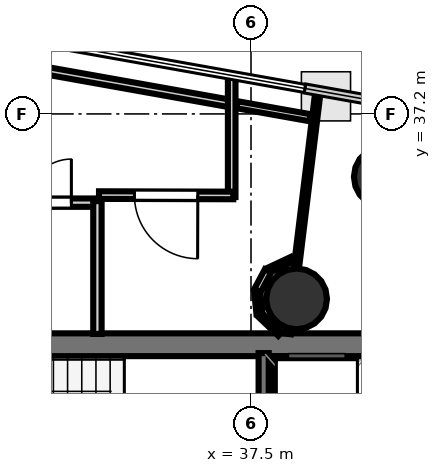
"""IFC4 building model, lengths in metres.
Left out: names, types, materials, properties, quantities, classifications, styles, units other than length and angle.
Written with IfcOpenShell. Run it as: python <this file> out.ifc"""

import sys

from ifc_helpers import new_model, si_unit, direction, frame, frame_2d, origin, origin_2d, place, context, subcontext, project, spatial, rectangle, hollow_circle, extrude, element, fill, save


model = new_model("IFC4")
c1 = context("Model", 3, precision=1e-05, world=origin(), true_north=direction((0.0, 1.0)))
c2 = subcontext(c1, "Body", "Model", "MODEL_VIEW")
j1 = project(units=[si_unit("LENGTHUNIT", "METRE"), si_unit("PLANEANGLEUNIT", "RADIAN")], contexts=[c1])
p1 = place(None, origin())
s1 = spatial("IfcSite", under=j1, at=p1, CompositionType="ELEMENT")
p2 = place(p1, origin())
s2 = spatial("IfcBuilding", under=s1, at=p2, CompositionType="ELEMENT")
p3 = place(p2, frame((0.0, 0.0, 207.7)))
s3 = spatial("IfcBuildingStorey", under=s2, at=p3, CompositionType="ELEMENT", Elevation=207.7)
p4 = place(p3, frame((29.33, 32.645, 0.0), z_axis=(0.0, 0.0, 1.0), x_axis=(1.0, 0.0, 0.0)))
e1 = element("IfcWall", 1, at=p4, inside=s3, PredefinedType="SHEAR", context=c2, shape_type="SweptSolid", body=[
    extrude(rectangle(XDim=10.52, YDim=0.45, at=frame_2d((5.26, 0.0))), origin(), (0.0, 0.0, 1.0), 3.52),
])
p5 = place(p4, frame((0.895, 0.0, 0.0)))
e2 = element("IfcOpeningElement", 2, at=p5, cuts=e1, PredefinedType="OPENING", context=c2, shape_type="SweptSolid", body=[
    extrude(rectangle(XDim=1.25, YDim=2.15, at=frame_2d((0.625, 1.075))), frame((0.0, 0.235, 0.0), z_axis=(0.0, -1.0, 0.0), x_axis=(1.0, 0.0, 0.0)), (0.0, 0.0, 1.0), 0.47),
])
p6 = place(p3, frame((38.18, 24.98, 0.0), z_axis=(0.0, 0.0, 1.0), x_axis=(0.0, 1.0, 0.0)))
e3 = element("IfcWall", 3, at=p6, inside=s3, PredefinedType="SHEAR", context=c2, shape_type="SweptSolid", body=[
    extrude(rectangle(XDim=7.44, YDim=0.45, at=frame_2d((3.72, 0.0))), origin(), (0.0, 0.0, 1.0), 3.52),
])
for number, where, z_axis, x_axis in (
    (4, (38.4, 33.55, 0.0), (0.0, 0.0, 1.0), (1.0, 0.0, 0.0)),
    (5, (40.131, 35.958, 0.0), (0.0, 0.0, 1.0), (1.0, 0.0, 0.0)),
):
    element("IfcColumn", number, at=place(p3, frame(where, z_axis=z_axis, x_axis=x_axis)), inside=s3, PredefinedType="COLUMN", context=c2, shape_type="SweptSolid", body=[
        extrude(hollow_circle(Radius=0.6, WallThickness=0.03, at=origin_2d()), origin(), (0.0, 0.0, 1.0), 3.7),
    ])
p7 = place(p3, frame((37.75, 30.12, 0.0), z_axis=(0.0, 0.0, 1.0), x_axis=(0.0, 1.0, 0.0)))
e6 = element("IfcWall", 6, at=p7, inside=s3, PredefinedType="SOLIDWALL", context=c2, shape_type="SweptSolid", body=[
    extrude(rectangle(XDim=2.36, YDim=0.2, at=frame_2d((1.18, 0.0))), origin(), (0.0, 0.0, 1.0), 3.52),
])
p8 = place(p3, frame((32.55, 35.449, 0.0), z_axis=(0.0, 0.0, 1.0), x_axis=(1.0, 0.0, 0.0)))
e7 = element("IfcWall", 7, at=p8, inside=s3, PredefinedType="PLUMBINGWALL", context=c2, shape_type="SweptSolid", body=[
    extrude(rectangle(XDim=1.95, YDim=0.165, at=frame_2d((0.975, 0.0))), origin(), (0.0, 0.0, 1.0), 2.84),
])
p9 = place(p8, frame((0.545, 0.0, 0.0)))
e8 = element("IfcOpeningElement", 8, at=p9, cuts=e7, PredefinedType="OPENING", context=c2, shape_type="SweptSolid", body=[
    extrude(rectangle(XDim=0.86, YDim=2.05, at=frame_2d((0.43, 1.025))), frame((0.0, 0.093, 0.0), z_axis=(0.0, -1.0, 0.0), x_axis=(1.0, 0.0, 0.0)), (0.0, 0.0, 1.0), 0.185),
])
p10 = place(p3, frame((34.469, 35.48, 0.0), z_axis=(0.0, 0.0, 1.0), x_axis=(0.0, -1.0, 0.0)))
e9 = element("IfcWall", 9, at=p10, inside=s3, PredefinedType="PLUMBINGWALL", context=c2, shape_type="SweptSolid", body=[
    extrude(rectangle(XDim=2.622, YDim=0.165, at=frame_2d((1.311, 0.0))), origin(), (0.0, 0.0, 1.0), 2.84),
])
p11 = place(p3, frame((31.966, 38.32, 0.0), z_axis=(0.0, 0.0, 1.0), x_axis=(0.98445853877, -0.175617155888, 0.0)))
e10 = element("IfcWall", 10, at=p11, inside=s3, PredefinedType="PARTITIONING", context=c2, shape_type="SweptSolid", body=[
    extrude(rectangle(XDim=5.26, YDim=0.15, at=frame_2d((2.63, 0.0))), origin(), (0.0, 0.0, 1.0), 2.84),
])
p12 = place(p3, frame((37.119, 37.98, 0.0), z_axis=(0.0, 0.0, 1.0), x_axis=(0.0, -1.0, 0.0)))
e11 = element("IfcWall", 11, at=p12, inside=s3, PredefinedType="PARTITIONING", context=c2, shape_type="SweptSolid", body=[
    extrude(rectangle(XDim=2.42, YDim=0.15, at=frame_2d((1.21, 0.0))), origin(), (0.0, 0.0, 1.0), 2.84),
])
p13 = place(p3, frame((37.15, 35.591, 0.0), z_axis=(0.0, 0.0, 1.0), x_axis=(-0.999996180994, 0.002763692808, 0.0)))
e12 = element("IfcWall", 12, at=p13, inside=s3, PredefinedType="PARTITIONING", context=c2, shape_type="SweptSolid", body=[
    extrude(rectangle(XDim=2.65, YDim=0.15, at=frame_2d((1.325, 0.0))), origin(), (0.0, 0.0, 1.0), 2.84),
])
p14 = place(p13, frame((0.7, 0.0, 0.0)))
e13 = element("IfcOpeningElement", 13, at=p14, cuts=e12, PredefinedType="OPENING", context=c2, shape_type="SweptSolid", body=[
    extrude(rectangle(XDim=1.25, YDim=2.2, at=frame_2d((0.625, 1.1))), frame((0.0, 0.085, 0.0), z_axis=(0.0, -1.0, 0.0), x_axis=(1.0, 0.0, 0.0)), (0.0, 0.0, 1.0), 0.17),
])
p15 = place(p3, frame((38.236, 32.858, 0.0), z_axis=(0.0, 0.0, 1.0), x_axis=(0.121669626561, 0.992570653391, 0.0)))
e14 = element("IfcWall", 14, at=p15, inside=s3, PredefinedType="PARTITIONING", context=c2, shape_type="SweptSolid", body=[
    extrude(rectangle(XDim=4.854, YDim=0.105, at=frame_2d((2.427, 0.0))), origin(), (0.0, 0.0, 1.0), 2.84),
])
p16 = place(p3, frame((37.225, 37.382, 0.0), z_axis=(0.0, 0.0, 1.0), x_axis=(0.984465754376, -0.175576702503, 0.0)))
e15 = element("IfcWall", 15, at=p16, inside=s3, PredefinedType="PARTITIONING", context=c2, shape_type="SweptSolid", body=[
    extrude(rectangle(XDim=1.461, YDim=0.14, at=frame_2d((0.731, 0.0))), origin(), (0.0, 0.0, 1.0), 2.84),
])
p17 = place(p3, frame((38.306, 34.33, 0.0), z_axis=(0.0, 0.0, 1.0), x_axis=(-0.905092592968, -0.425214531918, 0.0)))
e16 = element("IfcWall", 16, at=p17, inside=s3, PredefinedType="PARTITIONING", context=c2, shape_type="SweptSolid", body=[
    extrude(rectangle(XDim=0.505, YDim=0.105, at=frame_2d((0.252, 0.0))), origin(), (0.0, 0.0, 1.0), 2.84),
])
p18 = place(p3, frame((37.835, 34.102, 0.0), z_axis=(0.0, 0.0, 1.0), x_axis=(-0.471392110461, -0.881923737177, 0.0)))
e17 = element("IfcWall", 17, at=p18, inside=s3, PredefinedType="PARTITIONING", context=c2, shape_type="SweptSolid", body=[
    extrude(rectangle(XDim=0.441, YDim=0.14, at=frame_2d((0.221, 0.0))), origin(), (0.0, 0.0, 1.0), 2.84),
])
p19 = place(p3, frame((37.624, 33.695, 0.0), z_axis=(0.0, 0.0, 1.0), x_axis=(0.097915215421, -0.995194760129, 0.0)))
e18 = element("IfcWall", 18, at=p19, inside=s3, PredefinedType="PARTITIONING", context=c2, shape_type="SweptSolid", body=[
    extrude(rectangle(XDim=0.441, YDim=0.12, at=frame_2d((0.221, 0.0))), origin(), (0.0, 0.0, 1.0), 2.84),
])
p20 = place(p3, frame((37.677, 33.237, 0.0), z_axis=(0.0, 0.0, 1.0), x_axis=(0.72443362256, -0.689344562976, 0.0)))
e19 = element("IfcWall", 19, at=p20, inside=s3, PredefinedType="PARTITIONING", context=c2, shape_type="SweptSolid", body=[
    extrude(rectangle(XDim=0.55, YDim=0.105, at=frame_2d((0.275, 0.0))), origin(), (0.0, 0.0, 1.0), 2.84),
])
p21 = place(p9, origin())
e20 = element("IfcDoor", 20, at=p21, inside=s3, OperationType="SINGLE_SWING_RIGHT", PredefinedType="DOOR", context=c2, shape_type="SweptSolid", body=[
    extrude(rectangle(XDim=0.86, YDim=2.05, at=frame_2d((0.43, 1.025))), frame((0.0, 0.025, 0.0), z_axis=(0.0, -1.0, 0.0), x_axis=(1.0, 0.0, 0.0)), (0.0, 0.0, 1.0), 0.05),
])
fill(e8, e20)
p22 = place(p14, origin())
e21 = element("IfcDoor", 21, at=p22, inside=s3, OperationType="SINGLE_SWING_LEFT", PredefinedType="DOOR", context=c2, shape_type="SweptSolid", body=[
    extrude(rectangle(XDim=1.25, YDim=2.2, at=frame_2d((0.625, 1.1))), frame((0.0, 0.025, 0.0), z_axis=(0.0, -1.0, 0.0), x_axis=(1.0, 0.0, 0.0)), (0.0, 0.0, 1.0), 0.05),
])
fill(e13, e21)
save(model, sys.argv[1])
